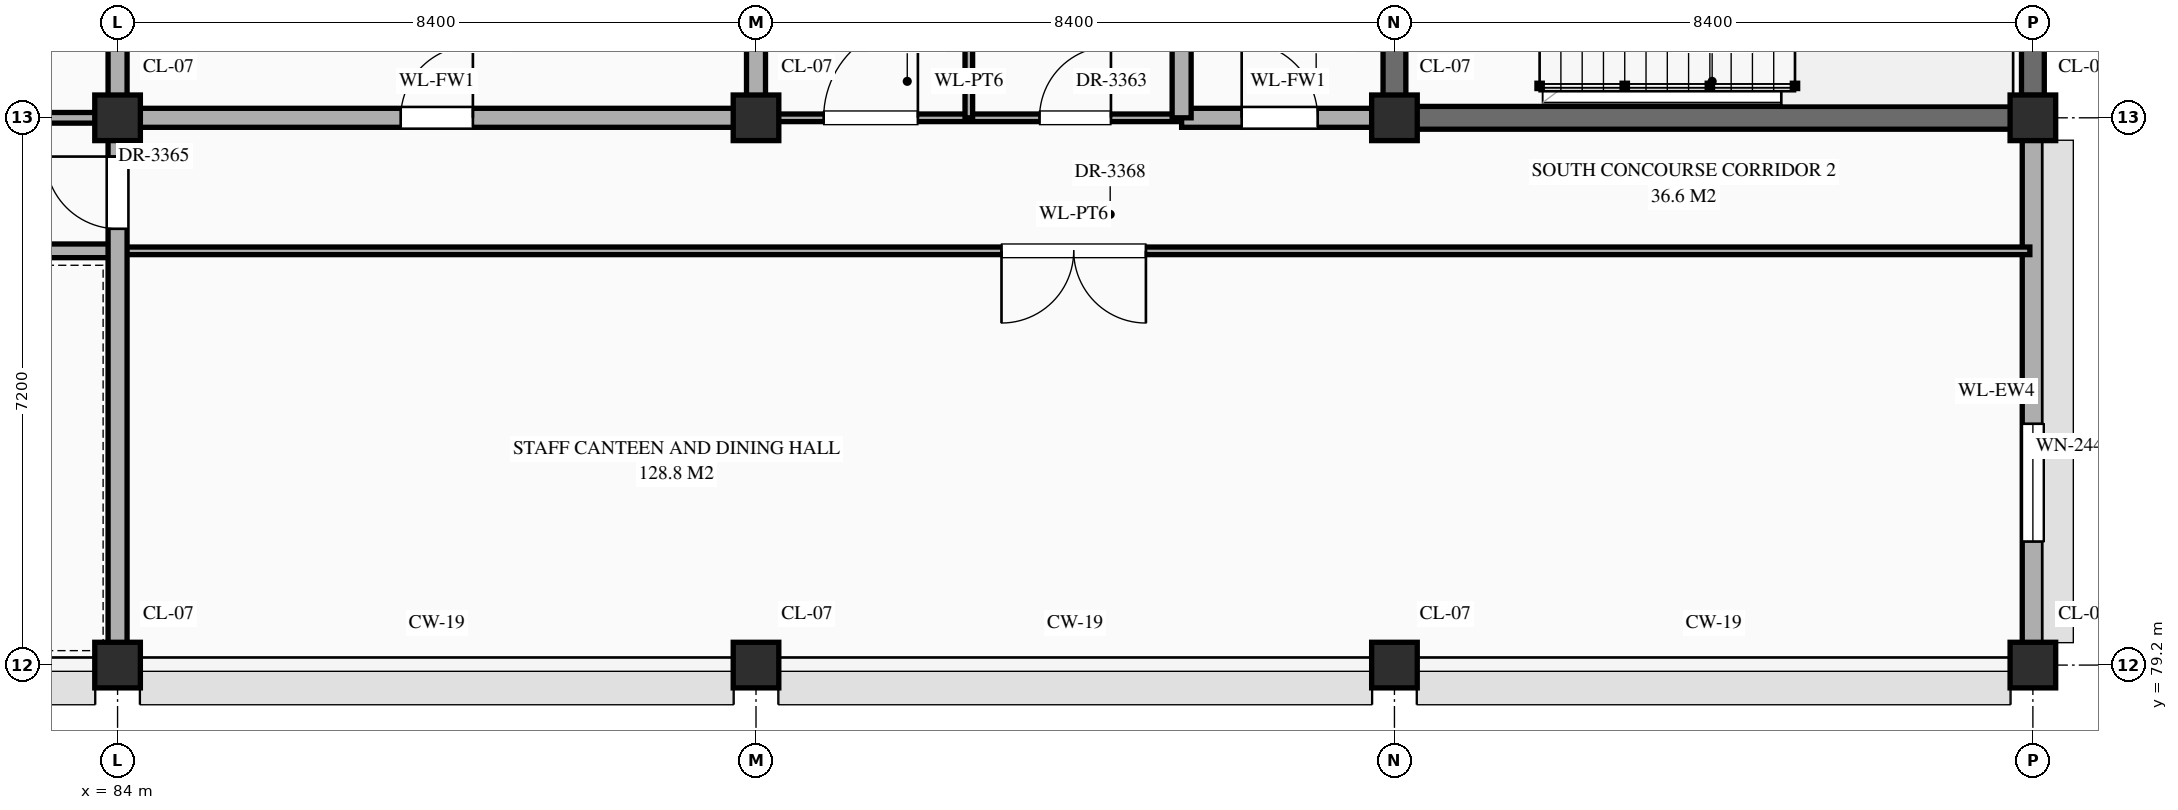
"""IFC4 building model, lengths in metres.
Left out: names, types, materials, properties, quantities, classifications, styles, units other than length and angle.
Written with IfcOpenShell. Run it as: python <this file> out.ifc"""

import sys

from ifc_helpers import new_model, si_unit, direction, frame, frame_2d, origin, origin_2d, place, context, subcontext, project, spatial, rectangle, extrude, element, fill, save


model = new_model("IFC4")
c1 = context("Model", 3, precision=1e-05, world=origin(), true_north=direction((0.0, 1.0)))
c2 = subcontext(c1, "Body", "Model", "MODEL_VIEW")
j1 = project(units=[si_unit("LENGTHUNIT", "METRE"), si_unit("PLANEANGLEUNIT", "RADIAN")], contexts=[c1])
p1 = place(None, origin())
s1 = spatial("IfcSite", under=j1, at=p1, CompositionType="ELEMENT")
p2 = place(p1, origin())
s2 = spatial("IfcBuilding", under=s1, at=p2, CompositionType="ELEMENT")
p3 = place(p2, frame((0.0, 0.0, 64.5)))
s3 = spatial("IfcBuildingStorey", under=s2, at=p3, CompositionType="ELEMENT", Elevation=64.5)
for number, where, z_axis, x_axis in (
    (1, (84.0, 79.2, 0.0), (0.0, 0.0, 1.0), (1.0, 0.0, 0.0)),
    (2, (84.0, 86.4, 0.0), (0.0, 0.0, 1.0), (1.0, 0.0, 0.0)),
    (3, (92.4, 79.2, 0.0), (0.0, 0.0, 1.0), (1.0, 0.0, 0.0)),
    (4, (92.4, 86.4, 0.0), (0.0, 0.0, 1.0), (1.0, 0.0, 0.0)),
    (5, (100.8, 79.2, 0.0), (0.0, 0.0, 1.0), (1.0, 0.0, 0.0)),
    (6, (100.8, 86.4, 0.0), (0.0, 0.0, 1.0), (1.0, 0.0, 0.0)),
    (7, (109.2, 79.2, 0.0), (0.0, 0.0, 1.0), (1.0, 0.0, 0.0)),
    (8, (109.2, 86.4, 0.0), (0.0, 0.0, 1.0), (1.0, 0.0, 0.0)),
):
    element("IfcColumn", number, at=place(p3, frame(where, z_axis=z_axis, x_axis=x_axis)), inside=s3, PredefinedType="COLUMN", context=c2, shape_type="SweptSolid", body=[
        extrude(rectangle(XDim=0.6, YDim=0.6, at=origin_2d()), origin(), (0.0, 0.0, 1.0), 4.2),
    ])
p4 = place(p3, frame((109.2, 79.495, 0.0), z_axis=(0.0, 0.0, 1.0), x_axis=(0.0, 1.0, 0.0)))
e9 = element("IfcWall", 9, at=p4, inside=s3, PredefinedType="STANDARD", context=c2, shape_type="SweptSolid", body=[
    extrude(rectangle(XDim=6.61, YDim=0.28, at=frame_2d((3.305, 0.0))), origin(), (0.0, 0.0, 1.0), 3.2),
])
p5 = place(p4, frame((1.33, 0.0, 0.85)))
e10 = element("IfcOpeningElement", 10, at=p5, cuts=e9, PredefinedType="OPENING", context=c2, shape_type="SweptSolid", body=[
    extrude(rectangle(XDim=1.55, YDim=1.74, at=frame_2d((0.775, 0.87))), frame((0.0, 0.152, 0.0), z_axis=(0.0, -1.0, 0.0), x_axis=(1.0, 0.0, 0.0)), (0.0, 0.0, 1.0), 0.304),
])
p6 = place(p3, frame((109.2, 86.695, 0.0), z_axis=(0.0, 0.0, 1.0), x_axis=(0.0, 1.0, 0.0)))
e11 = element("IfcWall", 11, at=p6, inside=s3, PredefinedType="SHEAR", context=c2, shape_type="SweptSolid", body=[
    extrude(rectangle(XDim=6.61, YDim=0.3, at=frame_2d((3.305, 0.0))), origin(), (0.0, 0.0, 1.0), 3.95),
])
p7 = place(p3, frame((67.2, 84.65, 0.0), z_axis=(0.0, 0.0, 1.0), x_axis=(1.0, 0.0, 0.0)))
e12 = element("IfcWall", 12, at=p7, inside=s3, PredefinedType="STANDARD", context=c2, shape_type="SweptSolid", body=[
    extrude(rectangle(XDim=16.8, YDim=0.18, at=frame_2d((8.4, 0.0))), origin(), (0.0, 0.0, 1.0), 3.85),
])
p8 = place(p7, frame((7.675, 0.0, 0.0)))
e13 = element("IfcOpeningElement", 13, at=p8, cuts=e12, PredefinedType="OPENING", context=c2, shape_type="SweptSolid", body=[
    extrude(rectangle(XDim=1.45, YDim=2.3, at=frame_2d((0.725, 1.15))), frame((0.0, 0.102, 0.0), z_axis=(0.0, -1.0, 0.0), x_axis=(1.0, 0.0, 0.0)), (0.0, 0.0, 1.0), 0.204),
])
p9 = place(p3, frame((84.0, 84.65, 0.0), z_axis=(0.0, 0.0, 1.0), x_axis=(1.0, 0.0, 0.0)))
e14 = element("IfcWall", 14, at=p9, inside=s3, PredefinedType="STANDARD", context=c2, shape_type="SweptSolid", body=[
    extrude(rectangle(XDim=25.16, YDim=0.1, at=frame_2d((12.58, 0.0))), origin(), (0.0, 0.0, 1.0), 3.85),
])
p10 = place(p9, frame((11.63, 0.0, 0.0)))
e15 = element("IfcOpeningElement", 15, at=p10, cuts=e14, PredefinedType="OPENING", context=c2, shape_type="SweptSolid", body=[
    extrude(rectangle(XDim=1.9, YDim=2.5, at=frame_2d((0.95, 1.25))), frame((0.0, 0.062, 0.0), z_axis=(0.0, -1.0, 0.0), x_axis=(1.0, 0.0, 0.0)), (0.0, 0.0, 1.0), 0.124),
])
p11 = place(p3, frame((75.6, 86.4, 0.0), z_axis=(0.0, 0.0, 1.0), x_axis=(1.0, 0.0, 0.0)))
e16 = element("IfcWall", 16, at=p11, inside=s3, PredefinedType="STANDARD", context=c2, shape_type="SweptSolid", body=[
    extrude(rectangle(XDim=8.4, YDim=0.14, at=frame_2d((4.2, 0.0))), origin(), (0.0, 0.0, 1.0), 3.0),
])
p12 = place(p3, frame((84.0, 86.4, 0.0), z_axis=(0.0, 0.0, 1.0), x_axis=(1.0, 0.0, 0.0)))
e17 = element("IfcWall", 17, at=p12, inside=s3, PredefinedType="STANDARD", context=c2, shape_type="SweptSolid", body=[
    extrude(rectangle(XDim=8.4, YDim=0.25, at=frame_2d((4.2, 0.0))), origin(), (0.0, 0.0, 1.0), 3.0),
])
p13 = place(p12, frame((3.725, 0.0, 0.0)))
e18 = element("IfcOpeningElement", 18, at=p13, cuts=e17, PredefinedType="OPENING", context=c2, shape_type="SweptSolid", body=[
    extrude(rectangle(XDim=0.95, YDim=2.15, at=frame_2d((0.475, 1.075))), frame((0.0, 0.137, 0.0), z_axis=(0.0, -1.0, 0.0), x_axis=(1.0, 0.0, 0.0)), (0.0, 0.0, 1.0), 0.274),
])
p14 = place(p3, frame((92.4, 86.4, 0.0), z_axis=(0.0, 0.0, 1.0), x_axis=(1.0, 0.0, 0.0)))
e19 = element("IfcWall", 19, at=p14, inside=s3, PredefinedType="STANDARD", context=c2, shape_type="SweptSolid", body=[
    extrude(rectangle(XDim=5.6, YDim=0.1, at=frame_2d((2.8, 0.0))), origin(), (0.0, 0.0, 1.0), 3.0),
])
p15 = place(p14, frame((0.89, 0.0, 0.0)))
e20 = element("IfcOpeningElement", 20, at=p15, cuts=e19, PredefinedType="OPENING", context=c2, shape_type="SweptSolid", body=[
    extrude(rectangle(XDim=1.24, YDim=2.3, at=frame_2d((0.62, 1.15))), frame((0.0, 0.062, 0.0), z_axis=(0.0, -1.0, 0.0), x_axis=(1.0, 0.0, 0.0)), (0.0, 0.0, 1.0), 0.124),
])
p16 = place(p14, frame((3.73, 0.0, 0.0)))
e21 = element("IfcOpeningElement", 21, at=p16, cuts=e19, PredefinedType="OPENING", context=c2, shape_type="SweptSolid", body=[
    extrude(rectangle(XDim=0.94, YDim=2.3, at=frame_2d((0.47, 1.15))), frame((0.0, 0.062, 0.0), z_axis=(0.0, -1.0, 0.0), x_axis=(1.0, 0.0, 0.0)), (0.0, 0.0, 1.0), 0.124),
])
p17 = place(p3, frame((98.0, 86.4, 0.0), z_axis=(0.0, 0.0, 1.0), x_axis=(1.0, 0.0, 0.0)))
e22 = element("IfcWall", 22, at=p17, inside=s3, PredefinedType="STANDARD", context=c2, shape_type="SweptSolid", body=[
    extrude(rectangle(XDim=2.8, YDim=0.25, at=frame_2d((1.4, 0.0))), origin(), (0.0, 0.0, 1.0), 3.0),
])
p18 = place(p17, frame((0.79, 0.0, 0.0)))
e23 = element("IfcOpeningElement", 23, at=p18, cuts=e22, PredefinedType="OPENING", context=c2, shape_type="SweptSolid", body=[
    extrude(rectangle(XDim=1.0, YDim=2.2, at=frame_2d((0.5, 1.1))), frame((0.0, 0.137, 0.0), z_axis=(0.0, -1.0, 0.0), x_axis=(1.0, 0.0, 0.0)), (0.0, 0.0, 1.0), 0.274),
])
p19 = place(p3, frame((100.8, 86.4, 0.0), z_axis=(0.0, 0.0, 1.0), x_axis=(1.0, 0.0, 0.0)))
e24 = element("IfcWall", 24, at=p19, inside=s3, PredefinedType="SHEAR", context=c2, shape_type="SweptSolid", body=[
    extrude(rectangle(XDim=8.36, YDim=0.3, at=frame_2d((4.18, 0.0))), origin(), (0.0, 0.0, 1.0), 3.85),
])
p20 = place(p3, frame((84.0, 79.24, 0.0), z_axis=(0.0, 0.0, 1.0), x_axis=(0.0, 1.0, 0.0)))
e25 = element("IfcWall", 25, at=p20, inside=s3, PredefinedType="STANDARD", context=c2, shape_type="SweptSolid", body=[
    extrude(rectangle(XDim=25.16, YDim=0.25, at=frame_2d((12.58, 0.0))), origin(), (0.0, 0.0, 1.0), 3.1),
])
p21 = place(p20, frame((22.72, 0.0, 0.0)))
e26 = element("IfcOpeningElement", 26, at=p21, cuts=e25, PredefinedType="OPENING", context=c2, shape_type="SweptSolid", body=[
    extrude(rectangle(XDim=1.5, YDim=2.25, at=frame_2d((0.75, 1.125))), frame((0.0, 0.137, 0.0), z_axis=(0.0, -1.0, 0.0), x_axis=(1.0, 0.0, 0.0)), (0.0, 0.0, 1.0), 0.274),
])
p22 = place(p20, frame((12.55, 0.0, 0.0)))
e27 = element("IfcOpeningElement", 27, at=p22, cuts=e25, PredefinedType="OPENING", context=c2, shape_type="SweptSolid", body=[
    extrude(rectangle(XDim=1.0, YDim=2.2, at=frame_2d((0.5, 1.1))), frame((0.0, 0.137, 0.0), z_axis=(0.0, -1.0, 0.0), x_axis=(1.0, 0.0, 0.0)), (0.0, 0.0, 1.0), 0.274),
])
p23 = place(p20, frame((14.87, 0.0, 0.0)))
e28 = element("IfcOpeningElement", 28, at=p23, cuts=e25, PredefinedType="OPENING", context=c2, shape_type="SweptSolid", body=[
    extrude(rectangle(XDim=0.95, YDim=2.15, at=frame_2d((0.475, 1.075))), frame((0.0, 0.137, 0.0), z_axis=(0.0, -1.0, 0.0), x_axis=(1.0, 0.0, 0.0)), (0.0, 0.0, 1.0), 0.274),
])
p24 = place(p20, frame((5.7, 0.0, 0.0)))
e29 = element("IfcOpeningElement", 29, at=p24, cuts=e25, PredefinedType="OPENING", context=c2, shape_type="SweptSolid", body=[
    extrude(rectangle(XDim=0.95, YDim=2.15, at=frame_2d((0.475, 1.075))), frame((0.0, 0.137, 0.0), z_axis=(0.0, -1.0, 0.0), x_axis=(1.0, 0.0, 0.0)), (0.0, 0.0, 1.0), 0.274),
])
p25 = place(p3, frame((92.4, 86.4, 0.0), z_axis=(0.0, 0.0, 1.0), x_axis=(0.0, 1.0, 0.0)))
e30 = element("IfcWall", 30, at=p25, inside=s3, PredefinedType="STANDARD", context=c2, shape_type="SweptSolid", body=[
    extrude(rectangle(XDim=7.2, YDim=0.25, at=frame_2d((3.6, 0.0))), origin(), (0.0, 0.0, 1.0), 3.2),
])
p26 = place(p3, frame((95.2, 86.4, 0.0), z_axis=(0.0, 0.0, 1.0), x_axis=(0.0, 1.0, 0.0)))
e31 = element("IfcWall", 31, at=p26, inside=s3, PredefinedType="STANDARD", context=c2, shape_type="SweptSolid", body=[
    extrude(rectangle(XDim=7.2, YDim=0.1, at=frame_2d((3.6, 0.0))), origin(), (0.0, 0.0, 1.0), 3.95),
])
p27 = place(p26, frame((3.0, 0.0, 0.0)))
e32 = element("IfcOpeningElement", 32, at=p27, cuts=e31, PredefinedType="OPENING", context=c2, shape_type="SweptSolid", body=[
    extrude(rectangle(XDim=1.2, YDim=2.35, at=frame_2d((0.6, 1.175))), frame((0.0, 0.062, 0.0), z_axis=(0.0, -1.0, 0.0), x_axis=(1.0, 0.0, 0.0)), (0.0, 0.0, 1.0), 0.124),
])
p28 = place(p3, frame((98.0, 86.4, 0.0), z_axis=(0.0, 0.0, 1.0), x_axis=(0.0, 1.0, 0.0)))
e33 = element("IfcWall", 33, at=p28, inside=s3, PredefinedType="STANDARD", context=c2, shape_type="SweptSolid", body=[
    extrude(rectangle(XDim=7.2, YDim=0.25, at=frame_2d((3.6, 0.0))), origin(), (0.0, 0.0, 1.0), 3.95),
])
p29 = place(p28, frame((3.125, 0.0, 0.0)))
e34 = element("IfcOpeningElement", 34, at=p29, cuts=e33, PredefinedType="OPENING", context=c2, shape_type="SweptSolid", body=[
    extrude(rectangle(XDim=0.95, YDim=2.15, at=frame_2d((0.475, 1.075))), frame((0.0, 0.137, 0.0), z_axis=(0.0, -1.0, 0.0), x_axis=(1.0, 0.0, 0.0)), (0.0, 0.0, 1.0), 0.274),
])
p30 = place(p3, frame((100.8, 86.4, 0.0), z_axis=(0.0, 0.0, 1.0), x_axis=(0.0, 1.0, 0.0)))
e35 = element("IfcWall", 35, at=p30, inside=s3, PredefinedType="SHEAR", context=c2, shape_type="SweptSolid", body=[
    extrude(rectangle(XDim=4.8, YDim=0.3, at=frame_2d((2.4, 0.0))), origin(), (0.0, 0.0, 1.0), 3.95),
])
p31 = place(p5, origin())
e36 = element("IfcWindow", 36, at=p31, inside=s3, PartitioningType="SINGLE_PANEL", PredefinedType="WINDOW", context=c2, shape_type="SweptSolid", body=[
    extrude(rectangle(XDim=1.55, YDim=1.74, at=frame_2d((0.775, 0.87))), frame((0.0, 0.03, 0.0), z_axis=(0.0, -1.0, 0.0), x_axis=(1.0, 0.0, 0.0)), (0.0, 0.0, 1.0), 0.06),
])
fill(e10, e36)
p32 = place(p13, origin())
e37 = element("IfcDoor", 37, at=p32, inside=s3, OperationType="SINGLE_SWING_RIGHT", PredefinedType="DOOR", context=c2, shape_type="SweptSolid", body=[
    extrude(rectangle(XDim=0.95, YDim=2.15, at=frame_2d((0.475, 1.075))), frame((0.0, 0.025, 0.0), z_axis=(0.0, -1.0, 0.0), x_axis=(1.0, 0.0, 0.0)), (0.0, 0.0, 1.0), 0.05),
])
fill(e18, e37)
p33 = place(p15, origin())
e38 = element("IfcDoor", 38, at=p33, inside=s3, OperationType="SINGLE_SWING_RIGHT", PredefinedType="DOOR", context=c2, shape_type="SweptSolid", body=[
    extrude(rectangle(XDim=1.24, YDim=2.3, at=frame_2d((0.62, 1.15))), frame((0.0, 0.025, 0.0), z_axis=(0.0, -1.0, 0.0), x_axis=(1.0, 0.0, 0.0)), (0.0, 0.0, 1.0), 0.05),
])
fill(e20, e38)
p34 = place(p16, origin())
e39 = element("IfcDoor", 39, at=p34, inside=s3, OperationType="SINGLE_SWING_RIGHT", PredefinedType="DOOR", context=c2, shape_type="SweptSolid", body=[
    extrude(rectangle(XDim=0.94, YDim=2.3, at=frame_2d((0.47, 1.15))), frame((0.0, 0.025, 0.0), z_axis=(0.0, -1.0, 0.0), x_axis=(1.0, 0.0, 0.0)), (0.0, 0.0, 1.0), 0.05),
])
fill(e21, e39)
p35 = place(p18, origin())
e40 = element("IfcDoor", 40, at=p35, inside=s3, OperationType="SINGLE_SWING_LEFT", PredefinedType="DOOR", context=c2, shape_type="SweptSolid", body=[
    extrude(rectangle(XDim=1.0, YDim=2.2, at=frame_2d((0.5, 1.1))), frame((0.0, 0.025, 0.0), z_axis=(0.0, -1.0, 0.0), x_axis=(1.0, 0.0, 0.0)), (0.0, 0.0, 1.0), 0.05),
])
fill(e23, e40)
p36 = place(p24, origin())
e41 = element("IfcDoor", 41, at=p36, inside=s3, OperationType="SINGLE_SWING_RIGHT", PredefinedType="DOOR", context=c2, shape_type="SweptSolid", body=[
    extrude(rectangle(XDim=0.95, YDim=2.15, at=frame_2d((0.475, 1.075))), frame((0.0, 0.025, 0.0), z_axis=(0.0, -1.0, 0.0), x_axis=(1.0, 0.0, 0.0)), (0.0, 0.0, 1.0), 0.05),
])
fill(e29, e41)
p37 = place(p10, frame((1.9, 0.0, 0.0), z_axis=(0.0, 0.0, 1.0), x_axis=(-1.0, 0.0, 0.0)))
e42 = element("IfcDoor", 42, at=p37, inside=s3, OperationType="DOUBLE_DOOR_SINGLE_SWING", PredefinedType="DOOR", context=c2, shape_type="SweptSolid", body=[
    extrude(rectangle(XDim=1.9, YDim=2.5, at=frame_2d((0.95, 1.25))), frame((0.0, 0.025, 0.0), z_axis=(0.0, -1.0, 0.0), x_axis=(1.0, 0.0, 0.0)), (0.0, 0.0, 1.0), 0.05),
])
fill(e15, e42)
save(model, sys.argv[1])
